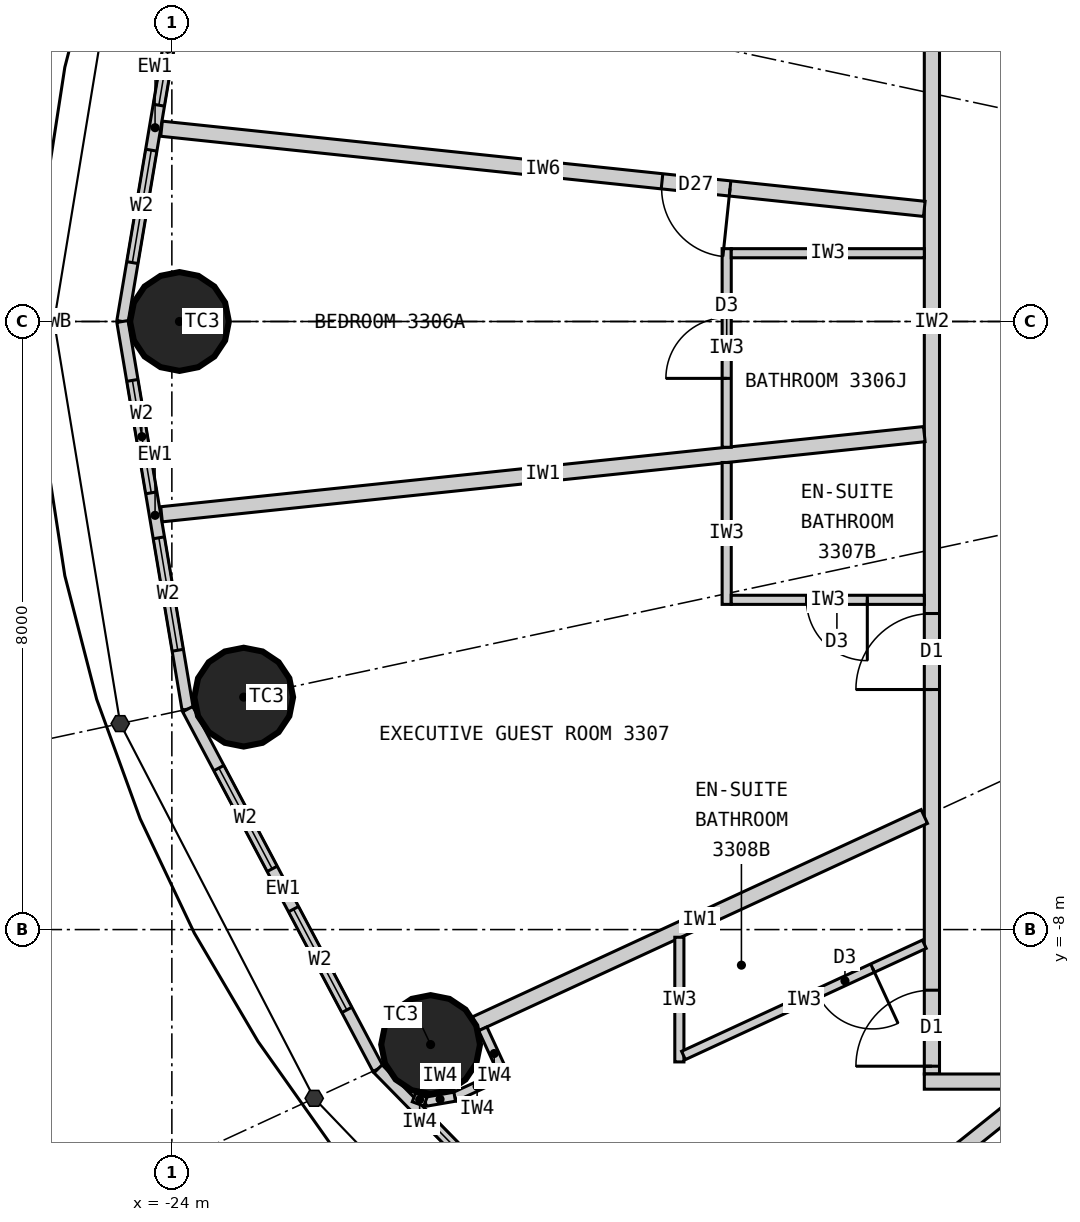
"""IFC4 building model, lengths in metres.
Left out: names, types, materials, properties, quantities, classifications, styles, units other than length and angle.
Written with IfcOpenShell. Run it as: python <this file> out.ifc"""

import sys

from ifc_helpers import new_model, si_unit, direction, frame, frame_2d, origin, origin_2d, place, context, subcontext, project, spatial, rectangle, circle, extrude, element, fill, save


model = new_model("IFC4")
c1 = context("Model", 3, precision=1e-05, world=origin(), true_north=direction((0.0, 1.0)))
c2 = subcontext(c1, "Body", "Model", "MODEL_VIEW")
j1 = project(units=[si_unit("LENGTHUNIT", "METRE"), si_unit("PLANEANGLEUNIT", "RADIAN")], contexts=[c1])
p1 = place(None, origin())
s1 = spatial("IfcSite", under=j1, at=p1, CompositionType="ELEMENT")
p2 = place(p1, origin())
s2 = spatial("IfcBuilding", under=s1, at=p2, CompositionType="ELEMENT")
p3 = place(p2, frame((0.0, 0.0, 128.7)))
s3 = spatial("IfcBuildingStorey", under=s2, at=p3, CompositionType="ELEMENT", Elevation=128.7)
for number, where, z_axis, x_axis in (
    (1, (-23.9, 0.0, 0.0), (0.0, 0.0, 1.0), (1.0, 0.0, 0.0)),
    (2, (-23.055, -4.942, 0.0), (0.0, 0.0, 1.0), (1.0, 0.0, 0.0)),
    (3, (-20.596, -9.513, 0.0), (0.0, 0.0, 1.0), (1.0, 0.0, 0.0)),
):
    element("IfcColumn", number, at=place(p3, frame(where, z_axis=z_axis, x_axis=x_axis)), inside=s3, PredefinedType="COLUMN", context=c2, shape_type="SweptSolid", body=[
        extrude(circle(Radius=0.65, at=origin_2d()), origin(), (0.0, 0.0, 1.0), 3.3),
    ])
p4 = place(p3, frame((-23.792, 5.1, 0.0), z_axis=(0.0, 0.0, 1.0), x_axis=(-0.165883894218, -0.986145290329, 0.0)))
e4 = element("IfcWall", 4, at=p4, inside=s3, PredefinedType="ELEMENTEDWALL", context=c2, shape_type="SweptSolid", body=[
    extrude(rectangle(XDim=5.172, YDim=0.15, at=frame_2d((2.586, 0.0))), origin(), (0.0, 0.0, 1.0), 3.12),
])
p5 = place(p4, frame((0.786, 0.0, 0.9)))
e5 = element("IfcOpeningElement", 5, at=p5, cuts=e4, PredefinedType="OPENING", context=c2, shape_type="SweptSolid", body=[
    extrude(rectangle(XDim=1.5, YDim=1.9, at=frame_2d((0.75, 0.95))), frame((0.0, 0.085, 0.0), z_axis=(0.0, -1.0, 0.0), x_axis=(1.0, 0.0, 0.0)), (0.0, 0.0, 1.0), 0.17),
])
p6 = place(p4, frame((2.886, 0.0, 0.9)))
e6 = element("IfcOpeningElement", 6, at=p6, cuts=e4, PredefinedType="OPENING", context=c2, shape_type="SweptSolid", body=[
    extrude(rectangle(XDim=1.5, YDim=1.9, at=frame_2d((0.75, 0.95))), frame((0.0, 0.085, 0.0), z_axis=(0.0, -1.0, 0.0), x_axis=(1.0, 0.0, 0.0)), (0.0, 0.0, 1.0), 0.17),
])
p7 = place(p3, frame((-24.65, 0.0, 0.0), z_axis=(0.0, 0.0, 1.0), x_axis=(0.165883894218, -0.986145290329, 0.0)))
e7 = element("IfcWall", 7, at=p7, inside=s3, PredefinedType="ELEMENTEDWALL", context=c2, shape_type="SweptSolid", body=[
    extrude(rectangle(XDim=5.172, YDim=0.15, at=frame_2d((2.586, 0.0))), origin(), (0.0, 0.0, 1.0), 3.12),
])
p8 = place(p7, frame((0.786, 0.0, 0.9)))
e8 = element("IfcOpeningElement", 8, at=p8, cuts=e7, PredefinedType="OPENING", context=c2, shape_type="SweptSolid", body=[
    extrude(rectangle(XDim=1.5, YDim=1.9, at=frame_2d((0.75, 0.95))), frame((0.0, 0.085, 0.0), z_axis=(0.0, -1.0, 0.0), x_axis=(1.0, 0.0, 0.0)), (0.0, 0.0, 1.0), 0.17),
])
p9 = place(p7, frame((2.886, 0.0, 0.9)))
e9 = element("IfcOpeningElement", 9, at=p9, cuts=e7, PredefinedType="OPENING", context=c2, shape_type="SweptSolid", body=[
    extrude(rectangle(XDim=1.5, YDim=1.9, at=frame_2d((0.75, 0.95))), frame((0.0, 0.085, 0.0), z_axis=(0.0, -1.0, 0.0), x_axis=(1.0, 0.0, 0.0)), (0.0, 0.0, 1.0), 0.17),
])
p10 = place(p3, frame((-23.792, -5.1, 0.0), z_axis=(0.0, 0.0, 1.0), x_axis=(0.467814388454, -0.883826735257, 0.0)))
e10 = element("IfcWall", 10, at=p10, inside=s3, PredefinedType="ELEMENTEDWALL", context=c2, shape_type="SweptSolid", body=[
    extrude(rectangle(XDim=5.354, YDim=0.15, at=frame_2d((2.677, 0.0))), origin(), (0.0, 0.0, 1.0), 3.12),
])
p11 = place(p10, frame((0.877, 0.0, 0.9)))
e11 = element("IfcOpeningElement", 11, at=p11, cuts=e10, PredefinedType="OPENING", context=c2, shape_type="SweptSolid", body=[
    extrude(rectangle(XDim=1.5, YDim=1.9, at=frame_2d((0.75, 0.95))), frame((0.0, 0.085, 0.0), z_axis=(0.0, -1.0, 0.0), x_axis=(1.0, 0.0, 0.0)), (0.0, 0.0, 1.0), 0.17),
])
p12 = place(p10, frame((2.977, 0.0, 0.9)))
e12 = element("IfcOpeningElement", 12, at=p12, cuts=e10, PredefinedType="OPENING", context=c2, shape_type="SweptSolid", body=[
    extrude(rectangle(XDim=1.5, YDim=1.9, at=frame_2d((0.75, 0.95))), frame((0.0, 0.085, 0.0), z_axis=(0.0, -1.0, 0.0), x_axis=(1.0, 0.0, 0.0)), (0.0, 0.0, 1.0), 0.17),
])
p13 = place(p3, frame((-21.287, -9.832, 0.0), z_axis=(0.0, 0.0, 1.0), x_axis=(0.700136650834, -0.714008872605, 0.0)))
e13 = element("IfcWall", 13, at=p13, inside=s3, PredefinedType="ELEMENTEDWALL", context=c2, shape_type="SweptSolid", body=[
    extrude(rectangle(XDim=5.649, YDim=0.15, at=frame_2d((2.825, 0.0))), origin(), (0.0, 0.0, 1.0), 3.12),
])
p14 = place(p13, frame((1.025, 0.0, 0.9)))
e14 = element("IfcOpeningElement", 14, at=p14, cuts=e13, PredefinedType="OPENING", context=c2, shape_type="SweptSolid", body=[
    extrude(rectangle(XDim=1.5, YDim=1.9, at=frame_2d((0.75, 0.95))), frame((0.0, 0.085, 0.0), z_axis=(0.0, -1.0, 0.0), x_axis=(1.0, 0.0, 0.0)), (0.0, 0.0, 1.0), 0.17),
])
p15 = place(p13, frame((3.125, 0.0, 0.9)))
e15 = element("IfcOpeningElement", 15, at=p15, cuts=e13, PredefinedType="OPENING", context=c2, shape_type="SweptSolid", body=[
    extrude(rectangle(XDim=1.5, YDim=1.9, at=frame_2d((0.75, 0.95))), frame((0.0, 0.085, 0.0), z_axis=(0.0, -1.0, 0.0), x_axis=(1.0, 0.0, 0.0)), (0.0, 0.0, 1.0), 0.17),
])
p16 = place(p3, frame((-14.0, 9.9, 0.0), z_axis=(0.0, 0.0, 1.0), x_axis=(0.0, -1.0, 0.0)))
e16 = element("IfcWall", 16, at=p16, inside=s3, PredefinedType="PARTITIONING", context=c2, shape_type="SweptSolid", body=[
    extrude(rectangle(XDim=19.8, YDim=0.2, at=frame_2d((9.9, 0.0))), origin(), (0.0, 0.0, 1.0), 3.12),
])
p17 = place(p16, frame((2.822, 0.0, 0.0)))
e17 = element("IfcOpeningElement", 17, at=p17, cuts=e16, PredefinedType="OPENING", context=c2, shape_type="SweptSolid", body=[
    extrude(rectangle(XDim=1.0, YDim=2.2, at=frame_2d((0.5, 1.1))), frame((0.0, 0.11, 0.0), z_axis=(0.0, -1.0, 0.0), x_axis=(1.0, 0.0, 0.0)), (0.0, 0.0, 1.0), 0.22),
])
p18 = place(p16, frame((13.742, 0.0, 0.0)))
e18 = element("IfcOpeningElement", 18, at=p18, cuts=e16, PredefinedType="OPENING", context=c2, shape_type="SweptSolid", body=[
    extrude(rectangle(XDim=1.0, YDim=2.2, at=frame_2d((0.5, 1.1))), frame((0.0, 0.11, 0.0), z_axis=(0.0, -1.0, 0.0), x_axis=(1.0, 0.0, 0.0)), (0.0, 0.0, 1.0), 0.22),
])
p19 = place(p16, frame((18.698, 0.0, 0.0)))
e19 = element("IfcOpeningElement", 19, at=p19, cuts=e16, PredefinedType="OPENING", context=c2, shape_type="SweptSolid", body=[
    extrude(rectangle(XDim=1.0, YDim=2.2, at=frame_2d((0.5, 1.1))), frame((0.0, 0.11, 0.0), z_axis=(0.0, -1.0, 0.0), x_axis=(1.0, 0.0, 0.0)), (0.0, 0.0, 1.0), 0.22),
])
p20 = place(p3, frame((-3.283, -10.0, 0.0), z_axis=(0.0, 0.0, 1.0), x_axis=(-1.0, 0.0, 0.0)))
e20 = element("IfcWall", 20, at=p20, inside=s3, PredefinedType="PARTITIONING", context=c2, shape_type="SweptSolid", body=[
    extrude(rectangle(XDim=10.817, YDim=0.2, at=frame_2d((5.409, 0.0))), origin(), (0.0, 0.0, 1.0), 3.12),
])
p21 = place(p20, frame((6.482, 0.0, 0.0)))
e21 = element("IfcOpeningElement", 21, at=p21, cuts=e20, PredefinedType="OPENING", context=c2, shape_type="SweptSolid", body=[
    extrude(rectangle(XDim=1.0, YDim=2.2, at=frame_2d((0.5, 1.1))), frame((0.0, 0.11, 0.0), z_axis=(0.0, -1.0, 0.0), x_axis=(1.0, 0.0, 0.0)), (0.0, 0.0, 1.0), 0.22),
])
p22 = place(p3, frame((-14.1, 1.482, 0.0), z_axis=(0.0, 0.0, 1.0), x_axis=(-0.994523202615, 0.104516024894, 0.0)))
e22 = element("IfcWall", 22, at=p22, inside=s3, PredefinedType="PARTITIONING", context=c2, shape_type="SweptSolid", body=[
    extrude(rectangle(XDim=10.091, YDim=0.2, at=frame_2d((5.045, 0.0))), origin(), (0.0, 0.0, 1.0), 2.47),
])
p23 = place(p22, frame((2.57, 0.0, 0.0)))
e23 = element("IfcOpeningElement", 23, at=p23, cuts=e22, PredefinedType="OPENING", context=c2, shape_type="SweptSolid", body=[
    extrude(rectangle(XDim=0.9, YDim=2.1, at=frame_2d((0.45, 1.05))), frame((0.0, 0.11, 0.0), z_axis=(0.0, -1.0, 0.0), x_axis=(1.0, 0.0, 0.0)), (0.0, 0.0, 1.0), 0.22),
])
p24 = place(p3, frame((-14.1, -1.482, 0.0), z_axis=(0.0, 0.0, 1.0), x_axis=(-0.994523202615, -0.104516024894, 0.0)))
e24 = element("IfcWall", 24, at=p24, inside=s3, PredefinedType="PARTITIONING", context=c2, shape_type="SweptSolid", body=[
    extrude(rectangle(XDim=10.091, YDim=0.2, at=frame_2d((5.045, 0.0))), origin(), (0.0, 0.0, 1.0), 2.47),
])
p25 = place(p3, frame((-14.1, -6.512, 0.0), z_axis=(0.0, 0.0, 1.0), x_axis=(-0.907833019998, -0.419331858797, 0.0)))
e25 = element("IfcWall", 25, at=p25, inside=s3, PredefinedType="PARTITIONING", context=c2, shape_type="SweptSolid", body=[
    extrude(rectangle(XDim=6.505, YDim=0.2, at=frame_2d((3.252, 0.0))), origin(), (0.0, 0.0, 1.0), 2.27),
])
p26 = place(p3, frame((-12.625, -10.1, 0.0), z_axis=(0.0, 0.0, 1.0), x_axis=(-0.780863644897, -0.624701503182, 0.0)))
e26 = element("IfcWall", 26, at=p26, inside=s3, PredefinedType="PARTITIONING", context=c2, shape_type="SweptSolid", body=[
    extrude(rectangle(XDim=4.612, YDim=0.2, at=frame_2d((2.306, 0.0))), origin(), (0.0, 0.0, 1.0), 2.37),
])
p27 = place(p3, frame((-16.7, -1.655, 0.0), z_axis=(0.0, 0.0, 1.0), x_axis=(0.0, 1.0, 0.0)))
e27 = element("IfcWall", 27, at=p27, inside=s3, PredefinedType="PARTITIONING", context=c2, shape_type="SweptSolid", body=[
    extrude(rectangle(XDim=2.613, YDim=0.12, at=frame_2d((1.307, 0.0))), origin(), (0.0, 0.0, 1.0), 3.12),
])
p28 = place(p27, frame((0.906, 0.0, 0.0)))
e28 = element("IfcOpeningElement", 28, at=p28, cuts=e27, PredefinedType="OPENING", context=c2, shape_type="SweptSolid", body=[
    extrude(rectangle(XDim=0.8, YDim=2.1, at=frame_2d((0.4, 1.05))), frame((0.0, 0.07, 0.0), z_axis=(0.0, -1.0, 0.0), x_axis=(1.0, 0.0, 0.0)), (0.0, 0.0, 1.0), 0.14),
])
p29 = place(p3, frame((-14.1, 0.898, 0.0), z_axis=(0.0, 0.0, 1.0), x_axis=(-1.0, 0.0, 0.0)))
e29 = element("IfcWall", 29, at=p29, inside=s3, PredefinedType="PARTITIONING", context=c2, shape_type="SweptSolid", body=[
    extrude(rectangle(XDim=2.54, YDim=0.12, at=frame_2d((1.27, 0.0))), origin(), (0.0, 0.0, 1.0), 3.12),
])
p30 = place(p3, frame((-16.7, -1.855, 0.0), z_axis=(0.0, 0.0, 1.0), x_axis=(0.0, -1.0, 0.0)))
e30 = element("IfcWall", 30, at=p30, inside=s3, PredefinedType="PARTITIONING", context=c2, shape_type="SweptSolid", body=[
    extrude(rectangle(XDim=1.867, YDim=0.12, at=frame_2d((0.933, 0.0))), origin(), (0.0, 0.0, 1.0), 3.12),
])
p31 = place(p3, frame((-14.1, -3.662, 0.0), z_axis=(0.0, 0.0, 1.0), x_axis=(-1.0, 0.0, 0.0)))
e31 = element("IfcWall", 31, at=p31, inside=s3, PredefinedType="PARTITIONING", context=c2, shape_type="SweptSolid", body=[
    extrude(rectangle(XDim=2.54, YDim=0.12, at=frame_2d((1.27, 0.0))), origin(), (0.0, 0.0, 1.0), 2.37),
])
p32 = place(p31, frame((0.75, 0.0, 0.0)))
e32 = element("IfcOpeningElement", 32, at=p32, cuts=e31, PredefinedType="OPENING", context=c2, shape_type="SweptSolid", body=[
    extrude(rectangle(XDim=0.8, YDim=2.1, at=frame_2d((0.4, 1.05))), frame((0.0, 0.07, 0.0), z_axis=(0.0, -1.0, 0.0), x_axis=(1.0, 0.0, 0.0)), (0.0, 0.0, 1.0), 0.14),
])
p33 = place(p3, frame((-17.323, -8.101, 0.0), z_axis=(0.0, 0.0, 1.0), x_axis=(0.0, -1.0, 0.0)))
e33 = element("IfcWall", 33, at=p33, inside=s3, PredefinedType="PARTITIONING", context=c2, shape_type="SweptSolid", body=[
    extrude(rectangle(XDim=1.64, YDim=0.12, at=frame_2d((0.82, 0.0))), origin(), (0.0, 0.0, 1.0), 3.12),
])
p34 = place(p3, frame((-14.1, -8.193, 0.0), z_axis=(0.0, 0.0, 1.0), x_axis=(-0.907836493557, -0.419324338628, 0.0)))
e34 = element("IfcWall", 34, at=p34, inside=s3, PredefinedType="PARTITIONING", context=c2, shape_type="SweptSolid", body=[
    extrude(rectangle(XDim=3.49, YDim=0.12, at=frame_2d((1.745, 0.0))), origin(), (0.0, 0.0, 1.0), 3.12),
])
p35 = place(p34, frame((0.75, 0.0, 0.0)))
e35 = element("IfcOpeningElement", 35, at=p35, cuts=e34, PredefinedType="OPENING", context=c2, shape_type="SweptSolid", body=[
    extrude(rectangle(XDim=0.8, YDim=2.1, at=frame_2d((0.4, 1.05))), frame((0.0, 0.07, 0.0), z_axis=(0.0, -1.0, 0.0), x_axis=(1.0, 0.0, 0.0)), (0.0, 0.0, 1.0), 0.14),
])
p36 = place(p3, frame((-19.909, -9.306, 0.0), z_axis=(0.0, 0.0, 1.0), x_axis=(0.419296148934, -0.90784951368, 0.0)))
e36 = element("IfcWall", 36, at=p36, inside=s3, PredefinedType="PARTITIONING", context=c2, shape_type="SweptSolid", body=[
    extrude(rectangle(XDim=0.716, YDim=0.12, at=frame_2d((0.358, 0.0))), origin(), (0.0, 0.0, 1.0), 3.12),
])
p37 = place(p3, frame((-19.689, -9.926, 0.0), z_axis=(0.0, 0.0, 1.0), x_axis=(-0.907893409272, -0.419201094227, 0.0)))
e37 = element("IfcWall", 37, at=p37, inside=s3, PredefinedType="PARTITIONING", context=c2, shape_type="SweptSolid", body=[
    extrude(rectangle(XDim=0.65, YDim=0.12, at=frame_2d((0.325, 0.0))), origin(), (0.0, 0.0, 1.0), 3.12),
])
p38 = place(p3, frame((-20.279, -10.199, 0.0), z_axis=(0.0, 0.0, 1.0), x_axis=(-0.985380740712, -0.170366651181, 0.0)))
e38 = element("IfcWall", 38, at=p38, inside=s3, PredefinedType="PARTITIONING", context=c2, shape_type="SweptSolid", body=[
    extrude(rectangle(XDim=0.391, YDim=0.12, at=frame_2d((0.196, 0.0))), origin(), (0.0, 0.0, 1.0), 3.12),
])
p39 = place(p3, frame((-20.664, -10.265, 0.0), z_axis=(0.0, 0.0, 1.0), x_axis=(-0.938058651481, 0.346476501918, 0.0)))
e39 = element("IfcWall", 39, at=p39, inside=s3, PredefinedType="PARTITIONING", context=c2, shape_type="SweptSolid", body=[
    extrude(rectangle(XDim=0.161, YDim=0.12, at=frame_2d((0.081, 0.0))), origin(), (0.0, 0.0, 1.0), 3.12),
])
p40 = place(p5, origin())
e40 = element("IfcWindow", 40, at=p40, inside=s3, PartitioningType="SINGLE_PANEL", PredefinedType="WINDOW", context=c2, shape_type="SweptSolid", body=[
    extrude(rectangle(XDim=1.5, YDim=1.9, at=frame_2d((0.75, 0.95))), frame((0.0, 0.03, 0.0), z_axis=(0.0, -1.0, 0.0), x_axis=(1.0, 0.0, 0.0)), (0.0, 0.0, 1.0), 0.06),
])
fill(e5, e40)
p41 = place(p6, origin())
e41 = element("IfcWindow", 41, at=p41, inside=s3, PartitioningType="SINGLE_PANEL", PredefinedType="WINDOW", context=c2, shape_type="SweptSolid", body=[
    extrude(rectangle(XDim=1.5, YDim=1.9, at=frame_2d((0.75, 0.95))), frame((0.0, 0.03, 0.0), z_axis=(0.0, -1.0, 0.0), x_axis=(1.0, 0.0, 0.0)), (0.0, 0.0, 1.0), 0.06),
])
fill(e6, e41)
p42 = place(p8, origin())
e42 = element("IfcWindow", 42, at=p42, inside=s3, PartitioningType="SINGLE_PANEL", PredefinedType="WINDOW", context=c2, shape_type="SweptSolid", body=[
    extrude(rectangle(XDim=1.5, YDim=1.9, at=frame_2d((0.75, 0.95))), frame((0.0, 0.03, 0.0), z_axis=(0.0, -1.0, 0.0), x_axis=(1.0, 0.0, 0.0)), (0.0, 0.0, 1.0), 0.06),
])
fill(e8, e42)
p43 = place(p9, origin())
e43 = element("IfcWindow", 43, at=p43, inside=s3, PartitioningType="SINGLE_PANEL", PredefinedType="WINDOW", context=c2, shape_type="SweptSolid", body=[
    extrude(rectangle(XDim=1.5, YDim=1.9, at=frame_2d((0.75, 0.95))), frame((0.0, 0.03, 0.0), z_axis=(0.0, -1.0, 0.0), x_axis=(1.0, 0.0, 0.0)), (0.0, 0.0, 1.0), 0.06),
])
fill(e9, e43)
p44 = place(p11, origin())
e44 = element("IfcWindow", 44, at=p44, inside=s3, PartitioningType="SINGLE_PANEL", PredefinedType="WINDOW", context=c2, shape_type="SweptSolid", body=[
    extrude(rectangle(XDim=1.5, YDim=1.9, at=frame_2d((0.75, 0.95))), frame((0.0, 0.03, 0.0), z_axis=(0.0, -1.0, 0.0), x_axis=(1.0, 0.0, 0.0)), (0.0, 0.0, 1.0), 0.06),
])
fill(e11, e44)
p45 = place(p12, origin())
e45 = element("IfcWindow", 45, at=p45, inside=s3, PartitioningType="SINGLE_PANEL", PredefinedType="WINDOW", context=c2, shape_type="SweptSolid", body=[
    extrude(rectangle(XDim=1.5, YDim=1.9, at=frame_2d((0.75, 0.95))), frame((0.0, 0.03, 0.0), z_axis=(0.0, -1.0, 0.0), x_axis=(1.0, 0.0, 0.0)), (0.0, 0.0, 1.0), 0.06),
])
fill(e12, e45)
p46 = place(p14, origin())
e46 = element("IfcWindow", 46, at=p46, inside=s3, PartitioningType="SINGLE_PANEL", PredefinedType="WINDOW", context=c2, shape_type="SweptSolid", body=[
    extrude(rectangle(XDim=1.5, YDim=1.9, at=frame_2d((0.75, 0.95))), frame((0.0, 0.03, 0.0), z_axis=(0.0, -1.0, 0.0), x_axis=(1.0, 0.0, 0.0)), (0.0, 0.0, 1.0), 0.06),
])
fill(e14, e46)
p47 = place(p28, origin())
e47 = element("IfcDoor", 47, at=p47, inside=s3, OperationType="SINGLE_SWING_LEFT", PredefinedType="DOOR", context=c2, shape_type="SweptSolid", body=[
    extrude(rectangle(XDim=0.8, YDim=2.1, at=frame_2d((0.4, 1.05))), frame((0.0, 0.025, 0.0), z_axis=(0.0, -1.0, 0.0), x_axis=(1.0, 0.0, 0.0)), (0.0, 0.0, 1.0), 0.05),
])
fill(e28, e47)
p48 = place(p23, origin())
e48 = element("IfcDoor", 48, at=p48, inside=s3, OperationType="SINGLE_SWING_LEFT", PredefinedType="DOOR", context=c2, shape_type="SweptSolid", body=[
    extrude(rectangle(XDim=0.9, YDim=2.1, at=frame_2d((0.45, 1.05))), frame((0.0, 0.025, 0.0), z_axis=(0.0, -1.0, 0.0), x_axis=(1.0, 0.0, 0.0)), (0.0, 0.0, 1.0), 0.05),
])
fill(e23, e48)
p49 = place(p32, origin())
e49 = element("IfcDoor", 49, at=p49, inside=s3, OperationType="SINGLE_SWING_LEFT", PredefinedType="DOOR", context=c2, shape_type="SweptSolid", body=[
    extrude(rectangle(XDim=0.8, YDim=2.1, at=frame_2d((0.4, 1.05))), frame((0.0, 0.025, 0.0), z_axis=(0.0, -1.0, 0.0), x_axis=(1.0, 0.0, 0.0)), (0.0, 0.0, 1.0), 0.05),
])
fill(e32, e49)
p50 = place(p18, origin())
e50 = element("IfcDoor", 50, at=p50, inside=s3, OperationType="SINGLE_SWING_RIGHT", PredefinedType="DOOR", context=c2, shape_type="SweptSolid", body=[
    extrude(rectangle(XDim=1.0, YDim=2.2, at=frame_2d((0.5, 1.1))), frame((0.0, 0.025, 0.0), z_axis=(0.0, -1.0, 0.0), x_axis=(1.0, 0.0, 0.0)), (0.0, 0.0, 1.0), 0.05),
])
fill(e18, e50)
p51 = place(p35, origin())
e51 = element("IfcDoor", 51, at=p51, inside=s3, OperationType="SINGLE_SWING_LEFT", PredefinedType="DOOR", context=c2, shape_type="SweptSolid", body=[
    extrude(rectangle(XDim=0.8, YDim=2.1, at=frame_2d((0.4, 1.05))), frame((0.0, 0.025, 0.0), z_axis=(0.0, -1.0, 0.0), x_axis=(1.0, 0.0, 0.0)), (0.0, 0.0, 1.0), 0.05),
])
fill(e35, e51)
p52 = place(p19, origin())
e52 = element("IfcDoor", 52, at=p52, inside=s3, OperationType="SINGLE_SWING_RIGHT", PredefinedType="DOOR", context=c2, shape_type="SweptSolid", body=[
    extrude(rectangle(XDim=1.0, YDim=2.2, at=frame_2d((0.5, 1.1))), frame((0.0, 0.025, 0.0), z_axis=(0.0, -1.0, 0.0), x_axis=(1.0, 0.0, 0.0)), (0.0, 0.0, 1.0), 0.05),
])
fill(e19, e52)
save(model, sys.argv[1])
